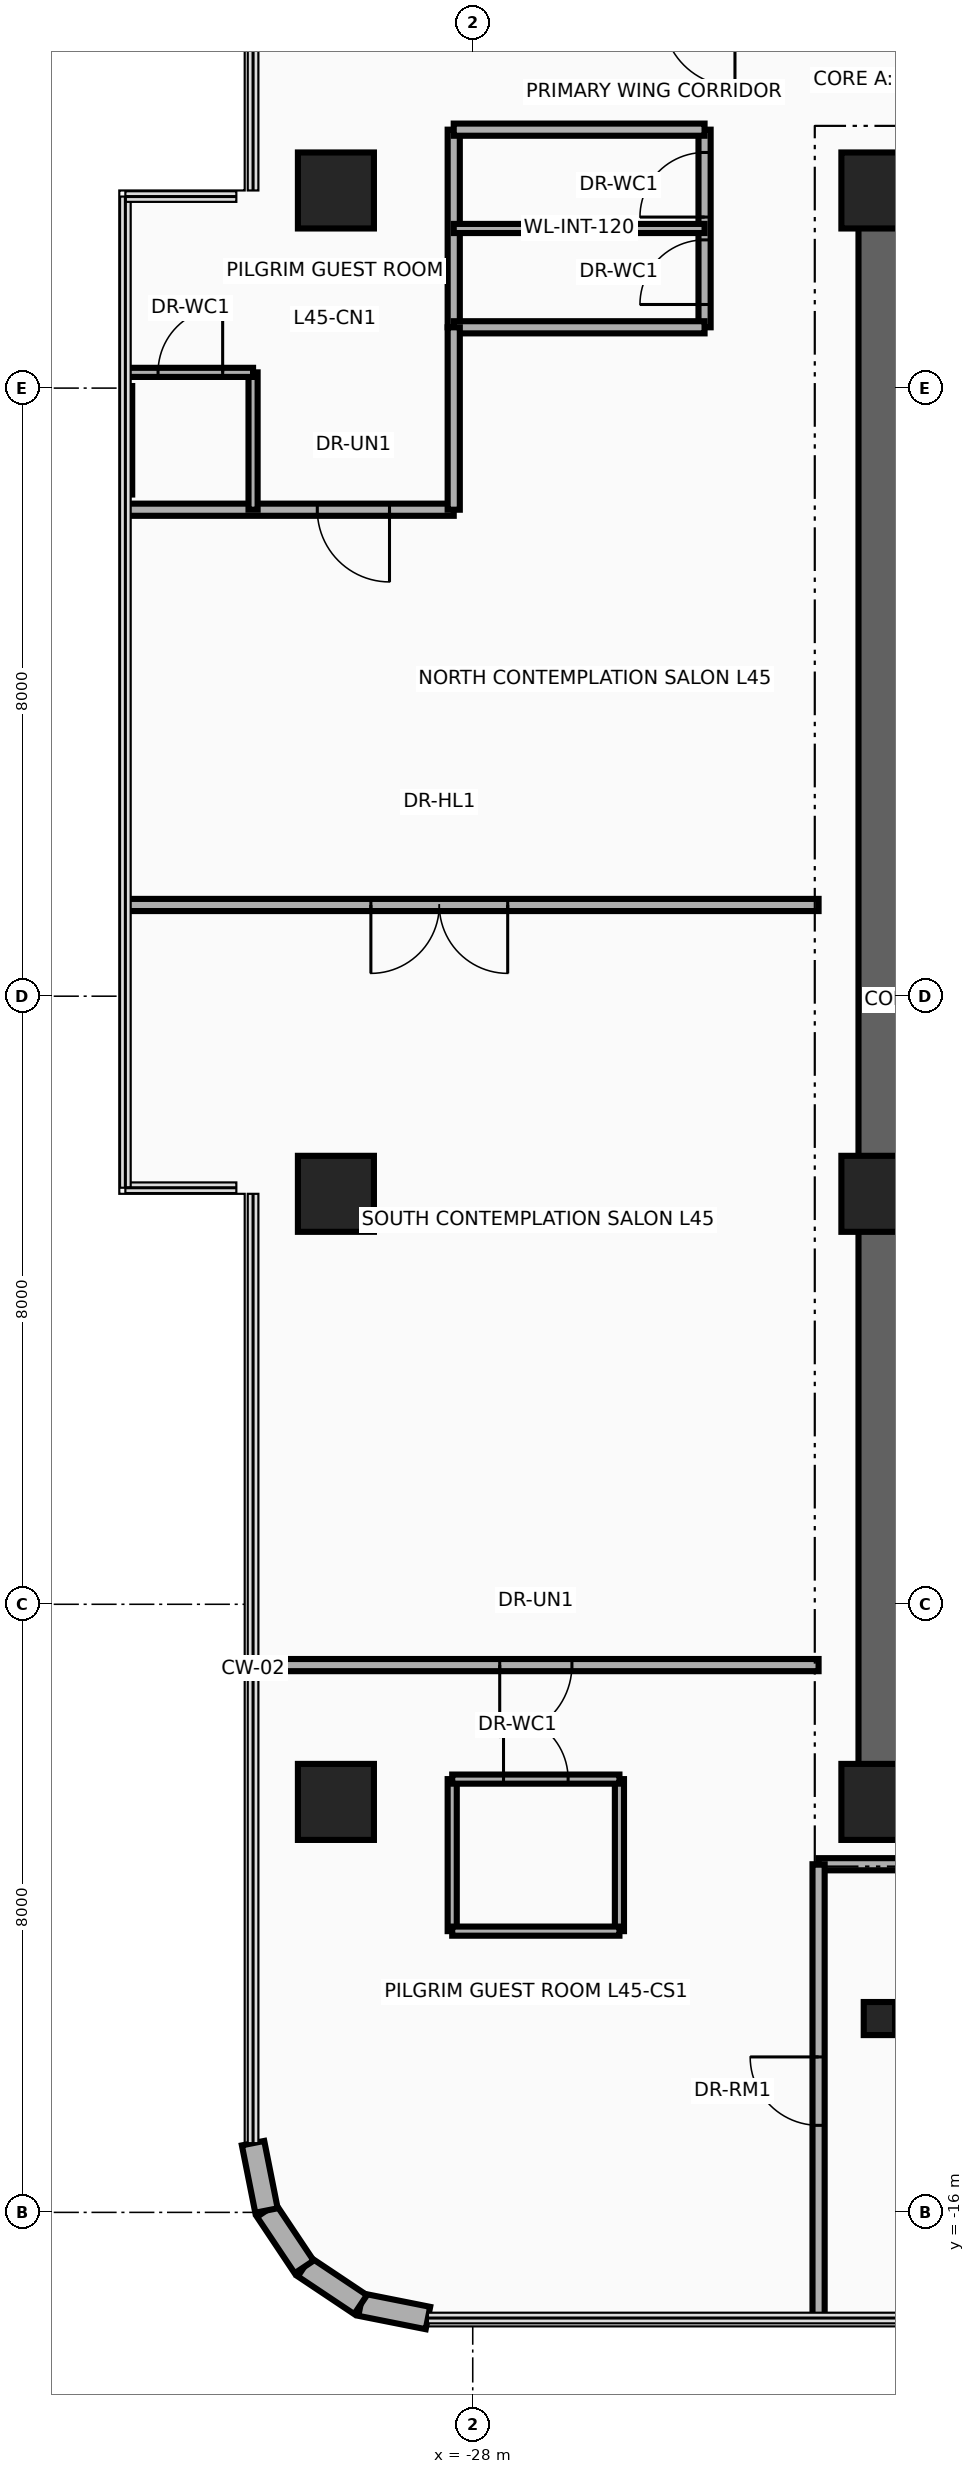
"""IFC4 building model, lengths in metres.
Left out: names, types, materials, properties, quantities, classifications, styles, units other than length and angle.
Written with IfcOpenShell. Run it as: python <this file> out.ifc"""

import sys

from ifc_helpers import new_model, si_unit, direction, frame, frame_2d, origin, origin_2d, place, context, subcontext, project, spatial, rectangle, i_section, extrude, source, transform, mapped, element, fill, save


model = new_model("IFC4")
c1 = context("Model", 3, precision=1e-05, world=origin(), true_north=direction((0.0, 1.0)))
c2 = subcontext(c1, "Body", "Model", "MODEL_VIEW")
j1 = project(units=[si_unit("LENGTHUNIT", "METRE"), si_unit("PLANEANGLEUNIT", "RADIAN")], contexts=[c1])
p1 = place(None, origin())
s1 = spatial("IfcSite", under=j1, at=p1, CompositionType="ELEMENT")
p2 = place(p1, origin())
s2 = spatial("IfcBuilding", under=s1, at=p2, CompositionType="ELEMENT")
p3 = place(p2, frame((0.0, 0.0, 176.55)))
s3 = spatial("IfcBuildingStorey", under=s2, at=p3, CompositionType="ELEMENT", Elevation=176.55)
p4 = place(p3, frame((-22.65, -11.075, 0.0), z_axis=(0.0, 0.0, 1.0), x_axis=(0.0, 1.0, 0.0)))
e1 = element("IfcWall", 1, at=p4, inside=s3, PredefinedType="SHEAR", context=c2, shape_type="SweptSolid", body=[
    extrude(rectangle(XDim=22.15, YDim=0.55, at=frame_2d((11.075, 0.0))), origin(), (0.0, 0.0, 1.0), 3.63),
])
for number, where, z_axis, x_axis in (
    (2, (-22.65, 10.8, 0.0), (0.0, 0.0, 1.0), (1.0, 0.0, 0.0)),
    (3, (-22.65, -10.8, 0.0), (0.0, 0.0, 1.0), (1.0, 0.0, 0.0)),
):
    element("IfcWall", number, at=place(p3, frame(where, z_axis=z_axis, x_axis=x_axis)), inside=s3, PredefinedType="SHEAR", context=c2, shape_type="SweptSolid", body=[
        extrude(rectangle(XDim=10.25, YDim=0.55, at=frame_2d((5.125, 0.0))), origin(), (0.0, 0.0, 1.0), 3.63),
    ])
m1 = source(origin(), c2, "Body", "SweptSolid", [
    extrude(rectangle(XDim=1.0, YDim=1.0, at=origin_2d()), origin(), (0.0, 0.0, 1.0), 3.95),
])
for number, where, z_axis, x_axis in (
    (4, (-29.8, -10.6, 0.0), (0.0, 0.0, 1.0), (1.0, 0.0, 0.0)),
    (5, (-22.65, -10.6, 0.0), (0.0, 0.0, 1.0), (1.0, 0.0, 0.0)),
    (6, (-29.8, -2.6, 0.0), (0.0, 0.0, 1.0), (1.0, 0.0, 0.0)),
    (7, (-22.65, -2.6, 0.0), (0.0, 0.0, 1.0), (1.0, 0.0, 0.0)),
    (8, (-29.8, 10.6, 0.0), (0.0, 0.0, 1.0), (1.0, 0.0, 0.0)),
    (9, (-22.65, 10.6, 0.0), (0.0, 0.0, 1.0), (1.0, 0.0, 0.0)),
):
    element("IfcColumn", number, at=place(p3, frame(where, z_axis=z_axis, x_axis=x_axis)), inside=s3, PredefinedType="COLUMN", context=c2, shape_type="MappedRepresentation", body=[
        mapped(m1, transform((0.0, 0.0, 0.0), x_axis=(1.0, 0.0, 0.0), y_axis=(0.0, 1.0, 0.0), z_axis=(0.0, 0.0, 1.0), scale=1.0)),
    ])
m2 = source(origin(), c2, "Body", "SweptSolid", [
    extrude(i_section(OverallWidth=0.412, OverallDepth=0.435, WebThickness=0.036, FlangeThickness=0.057, at=origin_2d()), origin(), (0.0, 0.0, 1.0), 3.95),
])
p5 = place(p3, frame((-22.65, -13.45, 0.0), z_axis=(0.0, 0.0, 1.0), x_axis=(1.0, 0.0, 0.0)))
e10 = element("IfcColumn", 10, at=p5, inside=s3, PredefinedType="COLUMN", context=c2, shape_type="MappedRepresentation", body=[
    mapped(m2, transform((0.0, 0.0, 0.0), x_axis=(1.0, 0.0, 0.0), y_axis=(0.0, 1.0, 0.0), z_axis=(0.0, 0.0, 1.0), scale=1.0)),
])
p6 = place(p3, frame((-28.589, -17.39, 0.0), z_axis=(0.0, 0.0, 1.0), x_axis=(-0.980798241101, 0.195025152871, 0.0)))
e11 = element("IfcWall", 11, at=p6, inside=s3, PredefinedType="SOLIDWALL", context=c2, shape_type="SweptSolid", body=[
    extrude(rectangle(XDim=0.904, YDim=0.3, at=frame_2d((0.452, 0.0))), origin(), (0.0, 0.0, 1.0), 3.63),
])
for number, where, z_axis, x_axis in (
    (12, (-29.476, -17.214, 0.0), (0.0, 0.0, 1.0), (-0.832, 0.556, 0.0)),
    (13, (-30.218, -16.718, 0.0), (0.0, 0.0, 1.0), (-0.556, 0.832, 0.0)),
):
    element("IfcWall", number, at=place(p3, frame(where, z_axis=z_axis, x_axis=x_axis)), inside=s3, PredefinedType="SOLIDWALL", context=c2, shape_type="SweptSolid", body=[
        extrude(rectangle(XDim=0.893, YDim=0.3, at=frame_2d((0.446, 0.0))), origin(), (0.0, 0.0, 1.0), 3.63),
    ])
p7 = place(p3, frame((-30.714, -15.976, 0.0), z_axis=(0.0, 0.0, 1.0), x_axis=(-0.195025152871, 0.980798241101, 0.0)))
e14 = element("IfcWall", 14, at=p7, inside=s3, PredefinedType="SOLIDWALL", context=c2, shape_type="SweptSolid", body=[
    extrude(rectangle(XDim=0.904, YDim=0.3, at=frame_2d((0.452, 0.0))), origin(), (0.0, 0.0, 1.0), 3.63),
])
p8 = place(p3, frame((-28.25, 8.8, 0.0), z_axis=(0.0, 0.0, 1.0), x_axis=(0.0, 1.0, 0.0)))
e15 = element("IfcWall", 15, at=p8, inside=s3, PredefinedType="PARTITIONING", context=c2, shape_type="SweptSolid", body=[
    extrude(rectangle(XDim=2.6, YDim=0.16, at=frame_2d((1.3, 0.0))), origin(), (0.0, 0.0, 1.0), 2.665),
])
p9 = place(p3, frame((-24.95, 8.8, 0.0), z_axis=(0.0, 0.0, 1.0), x_axis=(0.0, 1.0, 0.0)))
e16 = element("IfcWall", 16, at=p9, inside=s3, PredefinedType="PARTITIONING", context=c2, shape_type="SweptSolid", body=[
    extrude(rectangle(XDim=2.6, YDim=0.16, at=frame_2d((1.3, 0.0))), origin(), (0.0, 0.0, 1.0), 2.665),
])
p10 = place(p9, frame((0.3, 0.0, 0.0)))
e17 = element("IfcOpeningElement", 17, at=p10, cuts=e16, PredefinedType="OPENING", context=c2, shape_type="SweptSolid", body=[
    extrude(rectangle(XDim=0.85, YDim=2.1, at=frame_2d((0.425, 1.05))), frame((0.0, 0.095, 0.0), z_axis=(0.0, -1.0, 0.0), x_axis=(1.0, 0.0, 0.0)), (0.0, 0.0, 1.0), 0.19),
])
p11 = place(p9, frame((1.45, 0.0, 0.0)))
e18 = element("IfcOpeningElement", 18, at=p11, cuts=e16, PredefinedType="OPENING", context=c2, shape_type="SweptSolid", body=[
    extrude(rectangle(XDim=0.85, YDim=2.1, at=frame_2d((0.425, 1.05))), frame((0.0, 0.095, 0.0), z_axis=(0.0, -1.0, 0.0), x_axis=(1.0, 0.0, 0.0)), (0.0, 0.0, 1.0), 0.19),
])
for number, where, z_axis, x_axis in (
    (19, (-28.25, 8.8, 0.0), (0.0, 0.0, 1.0), (1.0, 0.0, 0.0)),
    (20, (-28.25, 11.4, 0.0), (0.0, 0.0, 1.0), (1.0, 0.0, 0.0)),
):
    element("IfcWall", number, at=place(p3, frame(where, z_axis=z_axis, x_axis=x_axis)), inside=s3, PredefinedType="PARTITIONING", context=c2, shape_type="SweptSolid", body=[
        extrude(rectangle(XDim=3.3, YDim=0.16, at=frame_2d((1.65, 0.0))), origin(), (0.0, 0.0, 1.0), 3.63),
    ])
p12 = place(p3, frame((-28.25, 10.1, 0.0), z_axis=(0.0, 0.0, 1.0), x_axis=(1.0, 0.0, 0.0)))
e21 = element("IfcWall", 21, at=p12, inside=s3, PredefinedType="PARTITIONING", context=c2, shape_type="SweptSolid", body=[
    extrude(rectangle(XDim=3.3, YDim=0.12, at=frame_2d((1.65, 0.0))), origin(), (0.0, 0.0, 1.0), 3.63),
])
p13 = place(p3, frame((-23.45, -11.42, 0.0), z_axis=(0.0, 0.0, 1.0), x_axis=(1.0, 0.0, 0.0)))
e22 = element("IfcWall", 22, at=p13, inside=s3, PredefinedType="PARTITIONING", context=c2, shape_type="SweptSolid", body=[
    extrude(rectangle(XDim=13.84, YDim=0.16, at=frame_2d((6.92, 0.0))), origin(), (0.0, 0.0, 1.0), 3.004),
])
p14 = place(p3, frame((-23.45, -17.39, 0.0), z_axis=(0.0, 0.0, 1.0), x_axis=(0.0, 1.0, 0.0)))
e23 = element("IfcWall", 23, at=p14, inside=s3, PredefinedType="PARTITIONING", context=c2, shape_type="SweptSolid", body=[
    extrude(rectangle(XDim=5.97, YDim=0.16, at=frame_2d((2.985, 0.0))), origin(), (0.0, 0.0, 1.0), 3.63),
])
p15 = place(p14, frame((2.535, 0.0, 0.0)))
e24 = element("IfcOpeningElement", 24, at=p15, cuts=e23, PredefinedType="OPENING", context=c2, shape_type="SweptSolid", body=[
    extrude(rectangle(XDim=0.9, YDim=2.1, at=frame_2d((0.45, 1.05))), frame((0.0, 0.095, 0.0), z_axis=(0.0, -1.0, 0.0), x_axis=(1.0, 0.0, 0.0)), (0.0, 0.0, 1.0), 0.19),
])
p16 = place(p3, frame((-30.89, -8.8, 0.0), z_axis=(0.0, 0.0, 1.0), x_axis=(1.0, 0.0, 0.0)))
e25 = element("IfcWall", 25, at=p16, inside=s3, PredefinedType="PARTITIONING", context=c2, shape_type="SweptSolid", body=[
    extrude(rectangle(XDim=7.44, YDim=0.16, at=frame_2d((3.72, 0.0))), origin(), (0.0, 0.0, 1.0), 3.076),
])
p17 = place(p16, frame((3.245, 0.0, 0.0)))
e26 = element("IfcOpeningElement", 26, at=p17, cuts=e25, PredefinedType="OPENING", context=c2, shape_type="SweptSolid", body=[
    extrude(rectangle(XDim=0.95, YDim=2.15, at=frame_2d((0.475, 1.075))), frame((0.0, 0.095, 0.0), z_axis=(0.0, -1.0, 0.0), x_axis=(1.0, 0.0, 0.0)), (0.0, 0.0, 1.0), 0.19),
])
p18 = place(p3, frame((-32.54, 6.4, 0.0), z_axis=(0.0, 0.0, 1.0), x_axis=(1.0, 0.0, 0.0)))
e27 = element("IfcWall", 27, at=p18, inside=s3, PredefinedType="PARTITIONING", context=c2, shape_type="SweptSolid", body=[
    extrude(rectangle(XDim=4.29, YDim=0.16, at=frame_2d((2.145, 0.0))), origin(), (0.0, 0.0, 1.0), 3.076),
])
p19 = place(p18, frame((2.495, 0.0, 0.0)))
e28 = element("IfcOpeningElement", 28, at=p19, cuts=e27, PredefinedType="OPENING", context=c2, shape_type="SweptSolid", body=[
    extrude(rectangle(XDim=0.95, YDim=2.15, at=frame_2d((0.475, 1.075))), frame((0.0, 0.095, 0.0), z_axis=(0.0, -1.0, 0.0), x_axis=(1.0, 0.0, 0.0)), (0.0, 0.0, 1.0), 0.19),
])
p20 = place(p3, frame((-28.25, 6.4, 0.0), z_axis=(0.0, 0.0, 1.0), x_axis=(0.0, 1.0, 0.0)))
e29 = element("IfcWall", 29, at=p20, inside=s3, PredefinedType="PARTITIONING", context=c2, shape_type="SweptSolid", body=[
    extrude(rectangle(XDim=2.4, YDim=0.16, at=frame_2d((1.2, 0.0))), origin(), (0.0, 0.0, 1.0), 3.158),
])
for number, where, z_axis, x_axis in (
    (30, (-28.27, -12.3, 0.0), (0.0, 0.0, 1.0), (0.0, 1.0, 0.0)),
    (31, (-26.07, -12.3, 0.0), (0.0, 0.0, 1.0), (0.0, 1.0, 0.0)),
):
    element("IfcWall", number, at=place(p3, frame(where, z_axis=z_axis, x_axis=x_axis)), inside=s3, PredefinedType="PARTITIONING", context=c2, shape_type="SweptSolid", body=[
        extrude(rectangle(XDim=2.0, YDim=0.12, at=frame_2d((1.0, 0.0))), origin(), (0.0, 0.0, 1.0), 2.665),
    ])
p21 = place(p3, frame((-28.27, -12.3, 0.0), z_axis=(0.0, 0.0, 1.0), x_axis=(1.0, 0.0, 0.0)))
e32 = element("IfcWall", 32, at=p21, inside=s3, PredefinedType="PARTITIONING", context=c2, shape_type="SweptSolid", body=[
    extrude(rectangle(XDim=2.2, YDim=0.12, at=frame_2d((1.1, 0.0))), origin(), (0.0, 0.0, 1.0), 3.63),
])
p22 = place(p3, frame((-28.27, -10.3, 0.0), z_axis=(0.0, 0.0, 1.0), x_axis=(1.0, 0.0, 0.0)))
e33 = element("IfcWall", 33, at=p22, inside=s3, PredefinedType="PARTITIONING", context=c2, shape_type="SweptSolid", body=[
    extrude(rectangle(XDim=2.2, YDim=0.12, at=frame_2d((1.1, 0.0))), origin(), (0.0, 0.0, 1.0), 3.63),
])
p23 = place(p22, frame((0.675, 0.0, 0.0)))
e34 = element("IfcOpeningElement", 34, at=p23, cuts=e33, PredefinedType="OPENING", context=c2, shape_type="SweptSolid", body=[
    extrude(rectangle(XDim=0.85, YDim=2.1, at=frame_2d((0.425, 1.05))), frame((0.0, 0.075, 0.0), z_axis=(0.0, -1.0, 0.0), x_axis=(1.0, 0.0, 0.0)), (0.0, 0.0, 1.0), 0.15),
])
p24 = place(p3, frame((-30.89, 6.4, 0.0), z_axis=(0.0, 0.0, 1.0), x_axis=(0.0, 1.0, 0.0)))
e35 = element("IfcWall", 35, at=p24, inside=s3, PredefinedType="PARTITIONING", context=c2, shape_type="SweptSolid", body=[
    extrude(rectangle(XDim=1.807, YDim=0.12, at=frame_2d((0.904, 0.0))), origin(), (0.0, 0.0, 1.0), 3.63),
])
p25 = place(p3, frame((-32.54, 8.207, 0.0), z_axis=(0.0, 0.0, 1.0), x_axis=(1.0, 0.0, 0.0)))
e36 = element("IfcWall", 36, at=p25, inside=s3, PredefinedType="PARTITIONING", context=c2, shape_type="SweptSolid", body=[
    extrude(rectangle(XDim=1.65, YDim=0.12, at=frame_2d((0.825, 0.0))), origin(), (0.0, 0.0, 1.0), 3.63),
])
p26 = place(p25, frame((0.4, 0.0, 0.0)))
e37 = element("IfcOpeningElement", 37, at=p26, cuts=e36, PredefinedType="OPENING", context=c2, shape_type="SweptSolid", body=[
    extrude(rectangle(XDim=0.85, YDim=2.1, at=frame_2d((0.425, 1.05))), frame((0.0, 0.075, 0.0), z_axis=(0.0, -1.0, 0.0), x_axis=(1.0, 0.0, 0.0)), (0.0, 0.0, 1.0), 0.15),
])
p27 = place(p3, frame((-32.54, 6.6, 0.0), z_axis=(0.0, 0.0, 1.0), x_axis=(0.0, 1.0, 0.0)))
e38 = element("IfcWall", 38, at=p27, inside=s3, PredefinedType="PARTITIONING", context=c2, shape_type="SweptSolid", body=[
    extrude(rectangle(XDim=1.427, YDim=0.12, at=frame_2d((0.713, 0.0))), origin(), (0.0, 0.0, 1.0), 3.264),
])
p28 = place(p3, frame((-32.54, 1.2, 0.0), z_axis=(0.0, 0.0, 1.0), x_axis=(1.0, 0.0, 0.0)))
e39 = element("IfcWall", 39, at=p28, inside=s3, PredefinedType="PARTITIONING", context=c2, shape_type="SweptSolid", body=[
    extrude(rectangle(XDim=9.09, YDim=0.16, at=frame_2d((4.545, 0.0))), origin(), (0.0, 0.0, 1.0), 3.076),
])
p29 = place(p28, frame((3.2, 0.0, 0.0)))
e40 = element("IfcOpeningElement", 40, at=p29, cuts=e39, PredefinedType="OPENING", context=c2, shape_type="SweptSolid", body=[
    extrude(rectangle(XDim=1.8, YDim=2.15, at=frame_2d((0.9, 1.075))), frame((0.0, 0.095, 0.0), z_axis=(0.0, -1.0, 0.0), x_axis=(1.0, 0.0, 0.0)), (0.0, 0.0, 1.0), 0.19),
])
p30 = place(p10, origin())
e41 = element("IfcDoor", 41, at=p30, inside=s3, OperationType="SINGLE_SWING_LEFT", PredefinedType="DOOR", context=c2, shape_type="SweptSolid", body=[
    extrude(rectangle(XDim=0.85, YDim=2.1, at=frame_2d((0.425, 1.05))), frame((0.0, 0.025, 0.0), z_axis=(0.0, -1.0, 0.0), x_axis=(1.0, 0.0, 0.0)), (0.0, 0.0, 1.0), 0.05),
])
fill(e17, e41)
p31 = place(p11, origin())
e42 = element("IfcDoor", 42, at=p31, inside=s3, OperationType="SINGLE_SWING_RIGHT", PredefinedType="DOOR", context=c2, shape_type="SweptSolid", body=[
    extrude(rectangle(XDim=0.85, YDim=2.1, at=frame_2d((0.425, 1.05))), frame((0.0, 0.025, 0.0), z_axis=(0.0, -1.0, 0.0), x_axis=(1.0, 0.0, 0.0)), (0.0, 0.0, 1.0), 0.05),
])
fill(e18, e42)
p32 = place(p17, frame((0.95, 0.0, 0.0), z_axis=(0.0, 0.0, 1.0), x_axis=(-1.0, 0.0, 0.0)))
e43 = element("IfcDoor", 43, at=p32, inside=s3, OperationType="SINGLE_SWING_LEFT", PredefinedType="DOOR", context=c2, shape_type="SweptSolid", body=[
    extrude(rectangle(XDim=0.95, YDim=2.15, at=frame_2d((0.475, 1.075))), frame((0.0, 0.025, 0.0), z_axis=(0.0, -1.0, 0.0), x_axis=(1.0, 0.0, 0.0)), (0.0, 0.0, 1.0), 0.05),
])
fill(e26, e43)
p33 = place(p23, origin())
e44 = element("IfcDoor", 44, at=p33, inside=s3, OperationType="SINGLE_SWING_RIGHT", PredefinedType="DOOR", context=c2, shape_type="SweptSolid", body=[
    extrude(rectangle(XDim=0.85, YDim=2.1, at=frame_2d((0.425, 1.05))), frame((0.0, 0.025, 0.0), z_axis=(0.0, -1.0, 0.0), x_axis=(1.0, 0.0, 0.0)), (0.0, 0.0, 1.0), 0.05),
])
fill(e34, e44)
p34 = place(p19, frame((0.95, 0.0, 0.0), z_axis=(0.0, 0.0, 1.0), x_axis=(-1.0, 0.0, 0.0)))
e45 = element("IfcDoor", 45, at=p34, inside=s3, OperationType="SINGLE_SWING_LEFT", PredefinedType="DOOR", context=c2, shape_type="SweptSolid", body=[
    extrude(rectangle(XDim=0.95, YDim=2.15, at=frame_2d((0.475, 1.075))), frame((0.0, 0.025, 0.0), z_axis=(0.0, -1.0, 0.0), x_axis=(1.0, 0.0, 0.0)), (0.0, 0.0, 1.0), 0.05),
])
fill(e28, e45)
p35 = place(p26, origin())
e46 = element("IfcDoor", 46, at=p35, inside=s3, OperationType="SINGLE_SWING_RIGHT", PredefinedType="DOOR", context=c2, shape_type="SweptSolid", body=[
    extrude(rectangle(XDim=0.85, YDim=2.1, at=frame_2d((0.425, 1.05))), frame((0.0, 0.025, 0.0), z_axis=(0.0, -1.0, 0.0), x_axis=(1.0, 0.0, 0.0)), (0.0, 0.0, 1.0), 0.05),
])
fill(e37, e46)
p36 = place(p29, frame((1.8, 0.0, 0.0), z_axis=(0.0, 0.0, 1.0), x_axis=(-1.0, 0.0, 0.0)))
e47 = element("IfcDoor", 47, at=p36, inside=s3, OperationType="DOUBLE_DOOR_SINGLE_SWING", PredefinedType="DOOR", context=c2, shape_type="SweptSolid", body=[
    extrude(rectangle(XDim=1.8, YDim=2.15, at=frame_2d((0.9, 1.075))), frame((0.0, 0.025, 0.0), z_axis=(0.0, -1.0, 0.0), x_axis=(1.0, 0.0, 0.0)), (0.0, 0.0, 1.0), 0.05),
])
fill(e40, e47)
p37 = place(p15, origin())
e48 = element("IfcDoor", 48, at=p37, inside=s3, OperationType="SINGLE_SWING_RIGHT", PredefinedType="DOOR", context=c2, shape_type="SweptSolid", body=[
    extrude(rectangle(XDim=0.9, YDim=2.1, at=frame_2d((0.45, 1.05))), frame((0.0, 0.025, 0.0), z_axis=(0.0, -1.0, 0.0), x_axis=(1.0, 0.0, 0.0)), (0.0, 0.0, 1.0), 0.05),
])
fill(e24, e48)
save(model, sys.argv[1])
